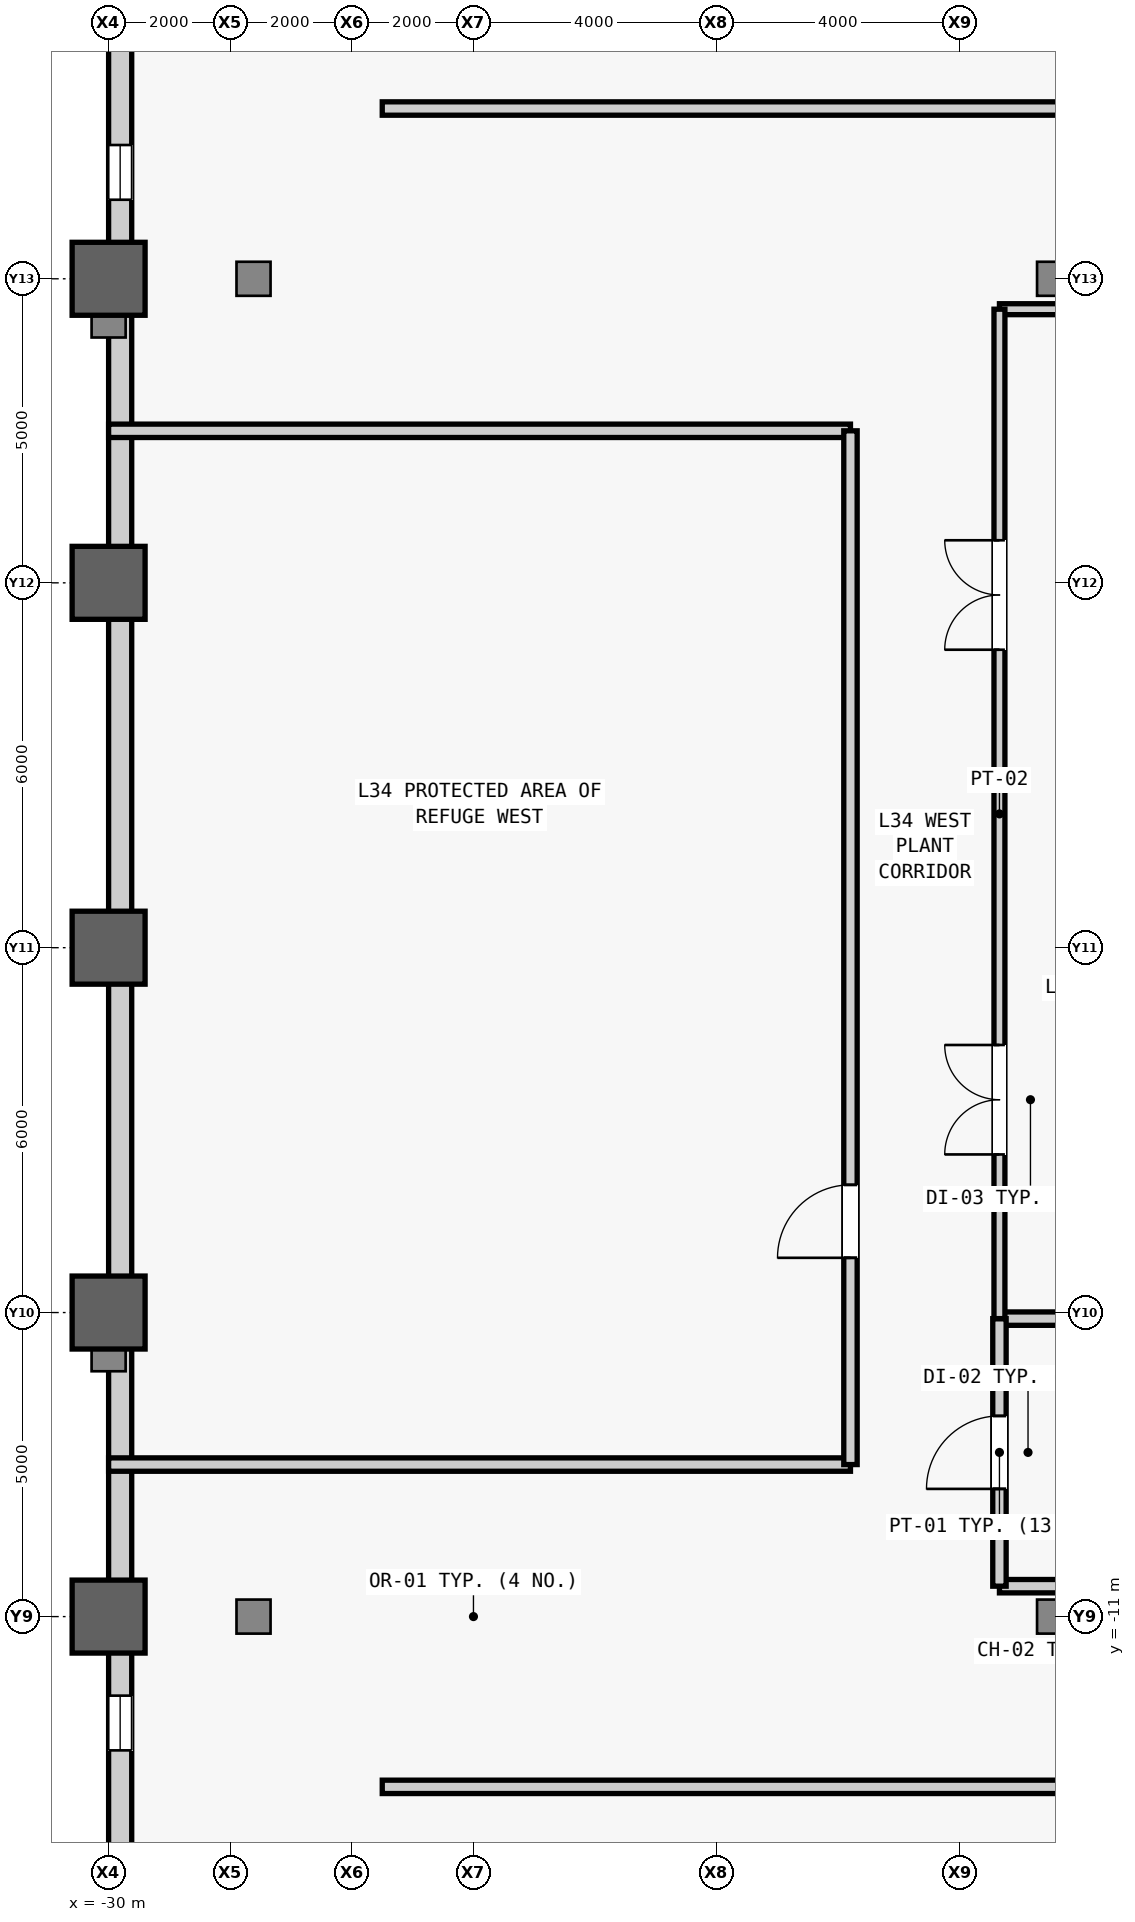
"""IFC4 building model, lengths in metres.
Left out: names, types, materials, properties, quantities, classifications, styles, units other than length and angle.
Written with IfcOpenShell. Run it as: python <this file> out.ifc"""

import sys

from ifc_helpers import new_model, si_unit, direction, frame, frame_2d, origin, origin_2d, place, context, subcontext, project, spatial, rectangle, hollow_rectangle, extrude, source, transform, mapped, element, fill, save


model = new_model("IFC4")
c1 = context("Model", 3, precision=1e-05, world=origin(), true_north=direction((0.0, 1.0)))
c2 = subcontext(c1, "Body", "Model", "MODEL_VIEW")
j1 = project(units=[si_unit("LENGTHUNIT", "METRE"), si_unit("PLANEANGLEUNIT", "RADIAN")], contexts=[c1])
p1 = place(None, origin())
s1 = spatial("IfcSite", under=j1, at=p1, CompositionType="ELEMENT")
p2 = place(p1, origin())
s2 = spatial("IfcBuilding", under=s1, at=p2, CompositionType="ELEMENT")
p3 = place(p2, frame((0.0, 0.0, 149.9)))
s3 = spatial("IfcBuildingStorey", under=s2, at=p3, CompositionType="ELEMENT", Elevation=149.9)
m1 = source(origin(), c2, "Body", "SweptSolid", [
    extrude(hollow_rectangle(XDim=1.2, YDim=1.2, WallThickness=0.07, at=origin_2d()), origin(), (0.0, 0.0, 1.0), 5.2),
])
for number, where, z_axis, x_axis in (
    (1, (-30.0, -11.0, 0.0), (0.0, 0.0, 1.0), (1.0, 0.0, 0.0)),
    (2, (-30.0, -6.0, 0.0), (0.0, 0.0, 1.0), (1.0, 0.0, 0.0)),
    (3, (-30.0, 0.0, 0.0), (0.0, 0.0, 1.0), (1.0, 0.0, 0.0)),
    (4, (-30.0, 6.0, 0.0), (0.0, 0.0, 1.0), (1.0, 0.0, 0.0)),
    (5, (-30.0, 11.0, 0.0), (0.0, 0.0, 1.0), (1.0, 0.0, 0.0)),
):
    element("IfcColumn", number, at=place(p3, frame(where, z_axis=z_axis, x_axis=x_axis)), inside=s3, PredefinedType="COLUMN", context=c2, shape_type="MappedRepresentation", body=[
        mapped(m1, transform((0.0, 0.0, 0.0), scale=1.0)),
    ])
m2 = source(origin(), c2, "Body", "SweptSolid", [
    extrude(rectangle(XDim=51.0, YDim=0.38, at=frame_2d((25.5, 0.0))), origin(), (0.0, 0.0, 1.0), 4.285),
])
p4 = place(p3, frame((-29.81, -25.5, 0.0), z_axis=(0.0, 0.0, 1.0), x_axis=(0.0, 1.0, 0.0)))
e6 = element("IfcWall", 6, at=p4, inside=s3, PredefinedType="STANDARD", context=c2, shape_type="MappedRepresentation", body=[
    mapped(m2, transform((0.0, 0.0, 0.0), scale=1.0)),
])
m3 = source(origin(), c2, "Body", "SweptSolid", [
    extrude(rectangle(XDim=0.9, YDim=2.4, at=frame_2d((0.45, 1.2))), frame((0.0, 0.2, 0.0), z_axis=(0.0, -1.0, 0.0), x_axis=(1.0, 0.0, 0.0)), (0.0, 0.0, 1.0), 0.4),
])
p5 = place(p4, frame((12.3, 0.0, 0.7)))
e7 = element("IfcOpeningElement", 7, at=p5, cuts=e6, PredefinedType="OPENING", context=c2, shape_type="MappedRepresentation", body=[
    mapped(m3, transform((0.0, 0.0, 0.0), scale=1.0)),
])
p6 = place(p4, frame((37.8, 0.0, 0.7)))
e8 = element("IfcOpeningElement", 8, at=p6, cuts=e6, PredefinedType="OPENING", context=c2, shape_type="MappedRepresentation", body=[
    mapped(m3, transform((0.0, 0.0, 0.0), scale=1.0)),
])
m4 = source(origin(), c2, "Body", "SweptSolid", [
    extrude(rectangle(XDim=4.05, YDim=0.22, at=frame_2d((2.025, 0.0))), origin(), (0.0, 0.0, 1.0), 4.98),
])
p7 = place(p3, frame((-15.35, -10.5, 0.0), z_axis=(0.0, 0.0, 1.0), x_axis=(1.0, 0.0, 0.0)))
e9 = element("IfcWall", 9, at=p7, inside=s3, PredefinedType="PARTITIONING", context=c2, shape_type="MappedRepresentation", body=[
    mapped(m4, transform((0.0, 0.0, 0.0), scale=1.0)),
])
m5 = source(origin(), c2, "Body", "SweptSolid", [
    extrude(rectangle(XDim=4.05, YDim=0.22, at=frame_2d((2.025, 0.0))), origin(), (0.0, 0.0, 1.0), 4.207),
])
p8 = place(p3, frame((-15.35, -6.1, 0.0), z_axis=(0.0, 0.0, 1.0), x_axis=(1.0, 0.0, 0.0)))
e10 = element("IfcWall", 10, at=p8, inside=s3, PredefinedType="PARTITIONING", context=c2, shape_type="MappedRepresentation", body=[
    mapped(m5, transform((0.0, 0.0, 0.0), scale=1.0)),
])
m6 = source(origin(), c2, "Body", "SweptSolid", [
    extrude(rectangle(XDim=4.4, YDim=0.22, at=frame_2d((2.2, 0.0))), origin(), (0.0, 0.0, 1.0), 4.98),
])
p9 = place(p3, frame((-15.35, -10.5, 0.0), z_axis=(0.0, 0.0, 1.0), x_axis=(0.0, 1.0, 0.0)))
e11 = element("IfcWall", 11, at=p9, inside=s3, PredefinedType="PARTITIONING", context=c2, shape_type="MappedRepresentation", body=[
    mapped(m6, transform((0.0, 0.0, 0.0), scale=1.0)),
])
m7 = source(origin(), c2, "Body", "SweptSolid", [
    extrude(rectangle(XDim=1.2, YDim=2.2, at=frame_2d((0.6, 1.1))), frame((0.0, 0.12, 0.0), z_axis=(0.0, -1.0, 0.0), x_axis=(1.0, 0.0, 0.0)), (0.0, 0.0, 1.0), 0.24),
])
p10 = place(p9, frame((1.6, 0.0, 0.0)))
e12 = element("IfcOpeningElement", 12, at=p10, cuts=e11, PredefinedType="OPENING", context=c2, shape_type="MappedRepresentation", body=[
    mapped(m7, transform((0.0, 0.0, 0.0), scale=1.0)),
])
m8 = source(origin(), c2, "Body", "SweptSolid", [
    extrude(rectangle(XDim=4.05, YDim=0.18, at=frame_2d((2.025, 0.0))), origin(), (0.0, 0.0, 1.0), 4.98),
])
p11 = place(p3, frame((-15.35, 10.5, 0.0), z_axis=(0.0, 0.0, 1.0), x_axis=(1.0, 0.0, 0.0)))
e13 = element("IfcWall", 13, at=p11, inside=s3, PredefinedType="PARTITIONING", context=c2, shape_type="MappedRepresentation", body=[
    mapped(m8, transform((0.0, 0.0, 0.0), scale=1.0)),
])
m9 = source(origin(), c2, "Body", "SweptSolid", [
    extrude(rectangle(XDim=16.6, YDim=0.18, at=frame_2d((8.3, 0.0))), origin(), (0.0, 0.0, 1.0), 4.98),
])
p12 = place(p3, frame((-15.35, -6.1, 0.0), z_axis=(0.0, 0.0, 1.0), x_axis=(0.0, 1.0, 0.0)))
e14 = element("IfcWall", 14, at=p12, inside=s3, PredefinedType="PARTITIONING", context=c2, shape_type="MappedRepresentation", body=[
    mapped(m9, transform((0.0, 0.0, 0.0), scale=1.0)),
])
m10 = source(origin(), c2, "Body", "SweptSolid", [
    extrude(rectangle(XDim=1.8, YDim=2.25, at=frame_2d((0.9, 1.125))), frame((0.0, 0.1, 0.0), z_axis=(0.0, -1.0, 0.0), x_axis=(1.0, 0.0, 0.0)), (0.0, 0.0, 1.0), 0.2),
])
p13 = place(p12, frame((2.7, 0.0, 0.0)))
e15 = element("IfcOpeningElement", 15, at=p13, cuts=e14, PredefinedType="OPENING", context=c2, shape_type="MappedRepresentation", body=[
    mapped(m10, transform((0.0, 0.0, 0.0), scale=1.0)),
])
p14 = place(p12, frame((11.0, 0.0, 0.0)))
e16 = element("IfcOpeningElement", 16, at=p14, cuts=e14, PredefinedType="OPENING", context=c2, shape_type="MappedRepresentation", body=[
    mapped(m10, transform((0.0, 0.0, 0.0), scale=1.0)),
])
m11 = source(origin(), c2, "Body", "SweptSolid", [
    extrude(rectangle(XDim=51.0, YDim=0.22, at=frame_2d((25.5, 0.0))), origin(), (0.0, 0.0, 1.0), 4.98),
])
p15 = place(p3, frame((-25.5, -13.8, 0.0), z_axis=(0.0, 0.0, 1.0), x_axis=(1.0, 0.0, 0.0)))
e17 = element("IfcWall", 17, at=p15, inside=s3, PredefinedType="PARTITIONING", context=c2, shape_type="MappedRepresentation", body=[
    mapped(m11, transform((0.0, 0.0, 0.0), scale=1.0)),
])
m12 = source(origin(), c2, "Body", "SweptSolid", [
    extrude(rectangle(XDim=1.5, YDim=2.3, at=frame_2d((0.75, 1.15))), frame((0.0, 0.12, 0.0), z_axis=(0.0, -1.0, 0.0), x_axis=(1.0, 0.0, 0.0)), (0.0, 0.0, 1.0), 0.24),
])
p16 = place(p15, frame((18.5, 0.0, 0.0)))
e18 = element("IfcOpeningElement", 18, at=p16, cuts=e17, PredefinedType="OPENING", context=c2, shape_type="MappedRepresentation", body=[
    mapped(m12, transform((0.0, 0.0, 0.0), scale=1.0)),
])
p17 = place(p15, frame((31.5, 0.0, 0.0)))
e19 = element("IfcOpeningElement", 19, at=p17, cuts=e17, PredefinedType="OPENING", context=c2, shape_type="MappedRepresentation", body=[
    mapped(m12, transform((0.0, 0.0, 0.0), scale=1.0)),
])
p18 = place(p3, frame((-25.5, 13.8, 0.0), z_axis=(0.0, 0.0, 1.0), x_axis=(1.0, 0.0, 0.0)))
e20 = element("IfcWall", 20, at=p18, inside=s3, PredefinedType="PARTITIONING", context=c2, shape_type="MappedRepresentation", body=[
    mapped(m11, transform((0.0, 0.0, 0.0), scale=1.0)),
])
p19 = place(p18, frame((16.25, 0.0, 0.0)))
e21 = element("IfcOpeningElement", 21, at=p19, cuts=e20, PredefinedType="OPENING", context=c2, shape_type="MappedRepresentation", body=[
    mapped(m12, transform((0.0, 0.0, 0.0), scale=1.0)),
])
p20 = place(p18, frame((25.25, 0.0, 0.0)))
e22 = element("IfcOpeningElement", 22, at=p20, cuts=e20, PredefinedType="OPENING", context=c2, shape_type="MappedRepresentation", body=[
    mapped(m12, transform((0.0, 0.0, 0.0), scale=1.0)),
])
p21 = place(p18, frame((34.4, 0.0, 0.0)))
e23 = element("IfcOpeningElement", 23, at=p21, cuts=e20, PredefinedType="OPENING", context=c2, shape_type="MappedRepresentation", body=[
    mapped(m12, transform((0.0, 0.0, 0.0), scale=1.0)),
])
m13 = source(origin(), c2, "Body", "SweptSolid", [
    extrude(rectangle(XDim=12.2, YDim=0.22, at=frame_2d((6.1, 0.0))), origin(), (0.0, 0.0, 1.0), 4.98),
])
for number, where, z_axis, x_axis in (
    (24, (-30.0, -8.5, 0.0), (0.0, 0.0, 1.0), (1.0, 0.0, 0.0)),
    (25, (-30.0, 8.5, 0.0), (0.0, 0.0, 1.0), (1.0, 0.0, 0.0)),
):
    element("IfcWall", number, at=place(p3, frame(where, z_axis=z_axis, x_axis=x_axis)), inside=s3, PredefinedType="PARTITIONING", context=c2, shape_type="MappedRepresentation", body=[
        mapped(m13, transform((0.0, 0.0, 0.0), scale=1.0)),
    ])
m14 = source(origin(), c2, "Body", "SweptSolid", [
    extrude(rectangle(XDim=17.0, YDim=0.22, at=frame_2d((8.5, 0.0))), origin(), (0.0, 0.0, 1.0), 4.98),
])
p22 = place(p3, frame((-17.8, -8.5, 0.0), z_axis=(0.0, 0.0, 1.0), x_axis=(0.0, 1.0, 0.0)))
e26 = element("IfcWall", 26, at=p22, inside=s3, PredefinedType="PARTITIONING", context=c2, shape_type="MappedRepresentation", body=[
    mapped(m14, transform((0.0, 0.0, 0.0), scale=1.0)),
])
p23 = place(p22, frame((3.4, 0.0, 0.0)))
e27 = element("IfcOpeningElement", 27, at=p23, cuts=e26, PredefinedType="OPENING", context=c2, shape_type="MappedRepresentation", body=[
    mapped(m7, transform((0.0, 0.0, 0.0), scale=1.0)),
])
m15 = source(origin(), c2, "Body", "SweptSolid", [
    extrude(rectangle(XDim=0.9, YDim=2.4, at=frame_2d((0.45, 1.2))), frame((0.0, 0.03, 0.0), z_axis=(0.0, -1.0, 0.0), x_axis=(1.0, 0.0, 0.0)), (0.0, 0.0, 1.0), 0.06),
])
p24 = place(p5, origin())
e28 = element("IfcWindow", 28, at=p24, inside=s3, PartitioningType="SINGLE_PANEL", PredefinedType="WINDOW", context=c2, shape_type="MappedRepresentation", body=[
    mapped(m15, transform((0.0, 0.0, 0.0), scale=1.0)),
])
fill(e7, e28)
p25 = place(p6, origin())
e29 = element("IfcWindow", 29, at=p25, inside=s3, PartitioningType="SINGLE_PANEL", PredefinedType="WINDOW", context=c2, shape_type="MappedRepresentation", body=[
    mapped(m15, transform((0.0, 0.0, 0.0), scale=1.0)),
])
fill(e8, e29)
m16 = source(origin(), c2, "Body", "SweptSolid", [
    extrude(rectangle(XDim=1.2, YDim=2.2, at=frame_2d((0.6, 1.1))), frame((0.0, 0.025, 0.0), z_axis=(0.0, -1.0, 0.0), x_axis=(1.0, 0.0, 0.0)), (0.0, 0.0, 1.0), 0.05),
])
p26 = place(p10, origin())
e30 = element("IfcDoor", 30, at=p26, inside=s3, OperationType="SINGLE_SWING_LEFT", PredefinedType="DOOR", context=c2, shape_type="MappedRepresentation", body=[
    mapped(m16, transform((0.0, 0.0, 0.0), scale=1.0)),
])
fill(e12, e30)
m17 = source(origin(), c2, "Body", "SweptSolid", [
    extrude(rectangle(XDim=1.8, YDim=2.25, at=frame_2d((0.9, 1.125))), frame((0.0, 0.025, 0.0), z_axis=(0.0, -1.0, 0.0), x_axis=(1.0, 0.0, 0.0)), (0.0, 0.0, 1.0), 0.05),
])
p27 = place(p13, origin())
e31 = element("IfcDoor", 31, at=p27, inside=s3, OperationType="SINGLE_SWING_LEFT", PredefinedType="DOOR", context=c2, shape_type="MappedRepresentation", body=[
    mapped(m17, transform((0.0, 0.0, 0.0), scale=1.0)),
])
fill(e15, e31)
p28 = place(p14, origin())
e32 = element("IfcDoor", 32, at=p28, inside=s3, OperationType="SINGLE_SWING_RIGHT", PredefinedType="DOOR", context=c2, shape_type="MappedRepresentation", body=[
    mapped(m17, transform((0.0, 0.0, 0.0), scale=1.0)),
])
fill(e16, e32)
p29 = place(p23, origin())
e33 = element("IfcDoor", 33, at=p29, inside=s3, OperationType="SINGLE_SWING_LEFT", PredefinedType="DOOR", context=c2, shape_type="MappedRepresentation", body=[
    mapped(m16, transform((0.0, 0.0, 0.0), scale=1.0)),
])
fill(e27, e33)
save(model, sys.argv[1])
